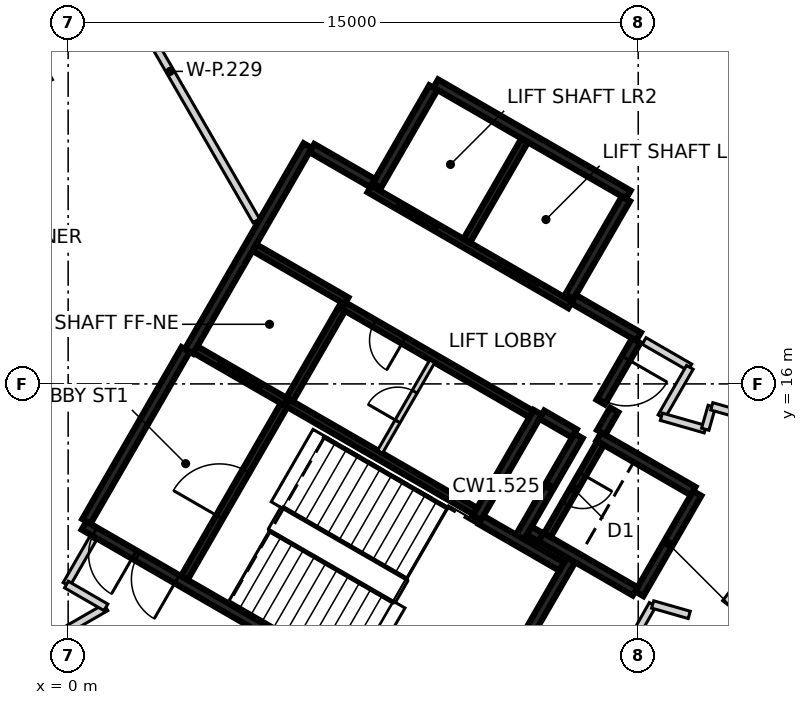
"""IFC4 building model, lengths in metres.
Left out: names, types, materials, properties, quantities, classifications, styles, units other than length and angle.
Written with IfcOpenShell. Run it as: python <this file> out.ifc"""

import sys

from ifc_helpers import new_model, si_unit, direction, frame, frame_2d, origin, place, context, subcontext, project, spatial, rectangle, extrude, element, fill, save


model = new_model("IFC4")
c1 = context("Model", 3, precision=1e-05, world=origin(), true_north=direction((0.0, 1.0)))
c2 = subcontext(c1, "Body", "Model", "MODEL_VIEW")
j1 = project(units=[si_unit("LENGTHUNIT", "METRE"), si_unit("PLANEANGLEUNIT", "RADIAN")], contexts=[c1])
p1 = place(None, origin())
s1 = spatial("IfcSite", under=j1, at=p1, CompositionType="ELEMENT")
p2 = place(p1, origin())
s2 = spatial("IfcBuilding", under=s1, at=p2, CompositionType="ELEMENT")
p3 = place(p2, frame((0.0, 0.0, 56.6)))
s3 = spatial("IfcBuildingStorey", under=s2, at=p3, CompositionType="ELEMENT", Elevation=56.6)
p4 = place(p3, frame((10.42, 6.498, 0.0), z_axis=(0.0, 0.0, 1.0), x_axis=(-0.866021906294, 0.500006057782, 0.0)))
e1 = element("IfcWall", 1, at=p4, inside=s3, PredefinedType="SHEAR", context=c2, shape_type="SweptSolid", body=[
    extrude(rectangle(XDim=11.55, YDim=0.25, at=frame_2d((5.775, 0.0))), origin(), (0.0, 0.0, 1.0), 3.125),
])
p5 = place(p4, frame((10.025, 0.0, 0.0)))
e2 = element("IfcOpeningElement", 2, at=p5, cuts=e1, PredefinedType="OPENING", context=c2, shape_type="SweptSolid", body=[
    extrude(rectangle(XDim=1.2, YDim=2.1, at=frame_2d((0.6, 1.05))), frame((0.0, 0.135, 0.0), z_axis=(0.0, -1.0, 0.0), x_axis=(1.0, 0.0, 0.0)), (0.0, 0.0, 1.0), 0.27),
])
p6 = place(p4, frame((8.725, 0.0, 0.0)))
e3 = element("IfcOpeningElement", 3, at=p6, cuts=e1, PredefinedType="OPENING", context=c2, shape_type="SweptSolid", body=[
    extrude(rectangle(XDim=1.2, YDim=2.1, at=frame_2d((0.6, 1.05))), frame((0.0, 0.135, 0.0), z_axis=(0.0, -1.0, 0.0), x_axis=(1.0, 0.0, 0.0)), (0.0, 0.0, 1.0), 0.27),
])
p7 = place(p3, frame((3.179, 16.856, 0.0), z_axis=(0.0, 0.0, 1.0), x_axis=(0.500004234368, 0.866022959057, 0.0)))
e4 = element("IfcWall", 4, at=p7, inside=s3, PredefinedType="SHEAR", context=c2, shape_type="SweptSolid", body=[
    extrude(rectangle(XDim=6.25, YDim=0.25, at=frame_2d((3.125, 0.0))), origin(), (0.0, 0.0, 1.0), 3.125),
])
p8 = place(p3, frame((9.673, 23.903, 0.0), z_axis=(0.0, 0.0, 1.0), x_axis=(0.86603616409, -0.499981362141, 0.0)))
e5 = element("IfcWall", 5, at=p8, inside=s3, PredefinedType="SHEAR", context=c2, shape_type="SweptSolid", body=[
    extrude(rectangle(XDim=5.85, YDim=0.25, at=frame_2d((2.925, 0.0))), origin(), (0.0, 0.0, 1.0), 3.125),
])
p9 = place(p3, frame((0.48, 12.381, 0.0), z_axis=(0.0, 0.0, 1.0), x_axis=(0.49999885962, 0.866026062182, 0.0)))
e6 = element("IfcWall", 6, at=p9, inside=s3, PredefinedType="SHEAR", context=c2, shape_type="SweptSolid", body=[
    extrude(rectangle(XDim=5.225, YDim=0.25, at=frame_2d((2.612, 0.0))), origin(), (0.0, 0.0, 1.0), 3.125),
])
p10 = place(p3, frame((13.238, 11.378, 0.0), z_axis=(0.0, 0.0, 1.0), x_axis=(-0.500008851346, -0.866020293397, 0.0)))
e7 = element("IfcWall", 7, at=p10, inside=s3, PredefinedType="SHEAR", context=c2, shape_type="SweptSolid", body=[
    extrude(rectangle(XDim=5.51, YDim=0.25, at=frame_2d((2.755, 0.0))), origin(), (0.0, 0.0, 1.0), 3.125),
])
p11 = place(p3, frame((12.357, 15.252, 0.0), z_axis=(0.0, 0.0, 1.0), x_axis=(-0.500028443584, -0.866008981251, 0.0)))
e8 = element("IfcWall", 8, at=p11, inside=s3, PredefinedType="SHEAR", context=c2, shape_type="SweptSolid", body=[
    extrude(rectangle(XDim=3.2, YDim=0.25, at=frame_2d((1.6, 0.0))), origin(), (0.0, 0.0, 1.0), 3.125),
])
for number, where, z_axis, x_axis in (
    (9, (8.123, 21.219, 0.0), (0.0, 0.0, 1.0), (0.5, 0.866, 0.0)),
    (10, (14.676, 20.87, 0.0), (0.0, 0.0, 1.0), (-0.5, -0.866, 0.0)),
):
    element("IfcWall", number, at=place(p3, frame(where, z_axis=z_axis, x_axis=x_axis)), inside=s3, PredefinedType="SHEAR", context=c2, shape_type="SweptSolid", body=[
        extrude(rectangle(XDim=2.975, YDim=0.25, at=frame_2d((1.487, 0.0))), origin(), (0.0, 0.0, 1.0), 3.125),
    ])
p12 = place(p3, frame((16.552, 13.119, 0.0), z_axis=(0.0, 0.0, 1.0), x_axis=(-0.499978833458, -0.866037623948, 0.0)))
e11 = element("IfcWall", 11, at=p12, inside=s3, PredefinedType="SHEAR", context=c2, shape_type="SweptSolid", body=[
    extrude(rectangle(XDim=3.05, YDim=0.25, at=frame_2d((1.525, 0.0))), origin(), (0.0, 0.0, 1.0), 3.125),
])
p13 = place(p3, frame((14.918, 10.54, 0.0), z_axis=(0.0, 0.0, 1.0), x_axis=(-0.866063538972, 0.499933942099, 0.0)))
e12 = element("IfcWall", 12, at=p13, inside=s3, PredefinedType="SHEAR", context=c2, shape_type="SweptSolid", body=[
    extrude(rectangle(XDim=2.865, YDim=0.25, at=frame_2d((1.432, 0.0))), origin(), (0.0, 0.0, 1.0), 3.125),
])
p14 = place(p3, frame((13.963, 14.614, 0.0), z_axis=(0.0, 0.0, 1.0), x_axis=(0.866042235819, -0.499970844928, 0.0)))
e13 = element("IfcWall", 13, at=p14, inside=s3, PredefinedType="SHEAR", context=c2, shape_type="SweptSolid", body=[
    extrude(rectangle(XDim=2.865, YDim=0.25, at=frame_2d((1.432, 0.0))), origin(), (0.0, 0.0, 1.0), 3.125),
])
p15 = place(p3, frame((11.888, 11.961, 0.0), z_axis=(0.0, 0.0, 1.0), x_axis=(0.500003324108, 0.866023484601, 0.0)))
e14 = element("IfcWall", 14, at=p15, inside=s3, PredefinedType="SHEAR", context=c2, shape_type="SweptSolid", body=[
    extrude(rectangle(XDim=3.085, YDim=0.25, at=frame_2d((1.542, 0.0))), origin(), (0.0, 0.0, 1.0), 3.125),
])
p16 = place(p3, frame((10.865, 12.418, 0.0), z_axis=(0.0, 0.0, 1.0), x_axis=(0.866026229868, -0.499998569178, 0.0)))
e15 = element("IfcWall", 15, at=p16, inside=s3, PredefinedType="SHEAR", context=c2, shape_type="SweptSolid", body=[
    extrude(rectangle(XDim=2.449, YDim=0.25, at=frame_2d((1.225, 0.0))), origin(), (0.0, 0.0, 1.0), 3.125),
])
p17 = place(p3, frame((13.297, 18.231, 0.0), z_axis=(0.0, 0.0, 1.0), x_axis=(0.866043531843, -0.499968599967, 0.0)))
e16 = element("IfcWall", 16, at=p17, inside=s3, PredefinedType="SHEAR", context=c2, shape_type="SweptSolid", body=[
    extrude(rectangle(XDim=1.975, YDim=0.25, at=frame_2d((0.987, 0.0))), origin(), (0.0, 0.0, 1.0), 3.125),
])
p18 = place(p3, frame((6.413, 22.206, 0.0), z_axis=(0.0, 0.0, 1.0), x_axis=(0.866016279763, -0.500015802937, 0.0)))
e17 = element("IfcWall", 17, at=p18, inside=s3, PredefinedType="SHEAR", context=c2, shape_type="SweptSolid", body=[
    extrude(rectangle(XDim=1.849, YDim=0.25, at=frame_2d((0.925, 0.0))), origin(), (0.0, 0.0, 1.0), 3.125),
])
p19 = place(p3, frame((14.945, 17.135, 0.0), z_axis=(0.0, 0.0, 1.0), x_axis=(-0.499983108224, -0.866035156036, 0.0)))
e18 = element("IfcWall", 18, at=p19, inside=s3, PredefinedType="SHEAR", context=c2, shape_type="SweptSolid", body=[
    extrude(rectangle(XDim=1.865, YDim=0.25, at=frame_2d((0.932, 0.0))), origin(), (0.0, 0.0, 1.0), 3.125),
])
p20 = place(p19, frame((0.535, 0.0, 0.0)))
e19 = element("IfcOpeningElement", 19, at=p20, cuts=e18, PredefinedType="OPENING", context=c2, shape_type="SweptSolid", body=[
    extrude(rectangle(XDim=1.25, YDim=2.1, at=frame_2d((0.625, 1.05))), frame((0.0, 0.135, 0.0), z_axis=(0.0, -1.0, 0.0), x_axis=(1.0, 0.0, 0.0)), (0.0, 0.0, 1.0), 0.27),
])
p21 = place(p3, frame((13.322, 14.695, 0.0), z_axis=(0.0, 0.0, 1.0), x_axis=(-0.866017078145, 0.500014420154, 0.0)))
e20 = element("IfcWall", 20, at=p21, inside=s3, PredefinedType="SHEAR", context=c2, shape_type="SweptSolid", body=[
    extrude(rectangle(XDim=0.989, YDim=0.25, at=frame_2d((0.495, 0.0))), origin(), (0.0, 0.0, 1.0), 3.125),
])
p22 = place(p3, frame((14.368, 15.315, 0.0), z_axis=(0.0, 0.0, 1.0), x_axis=(-0.499897359611, -0.866084655132, 0.0)))
e21 = element("IfcWall", 21, at=p22, inside=s3, PredefinedType="SHEAR", context=c2, shape_type="SweptSolid", body=[
    extrude(rectangle(XDim=0.685, YDim=0.25, at=frame_2d((0.342, 0.0))), origin(), (0.0, 0.0, 1.0), 3.125),
])
p23 = place(p3, frame((12.433, 11.964, 0.0), z_axis=(0.0, 0.0, 1.0), x_axis=(-0.866055875208, 0.499947218231, 0.0)))
e22 = element("IfcWall", 22, at=p23, inside=s3, PredefinedType="SHEAR", context=c2, shape_type="SweptSolid", body=[
    extrude(rectangle(XDim=0.345, YDim=0.25, at=frame_2d((0.172, 0.0))), origin(), (0.0, 0.0, 1.0), 3.125),
])
p24 = place(p3, frame((13.21, 18.08, 0.0), z_axis=(0.0, 0.0, 1.0), x_axis=(-0.866030299012, 0.499991521122, 0.0)))
e23 = element("IfcWall", 23, at=p24, inside=s3, PredefinedType="SHEAR", context=c2, shape_type="SweptSolid", body=[
    extrude(rectangle(XDim=6.1, YDim=0.2, at=frame_2d((3.05, 0.0))), origin(), (0.0, 0.0, 1.0), 3.125),
])
p25 = place(p24, frame((1.0, 0.0, 0.0)))
e24 = element("IfcOpeningElement", 24, at=p25, cuts=e23, PredefinedType="OPENING", context=c2, shape_type="SweptSolid", body=[
    extrude(rectangle(XDim=1.2, YDim=2.1, at=frame_2d((0.6, 1.05))), frame((0.0, 0.11, 0.0), z_axis=(0.0, -1.0, 0.0), x_axis=(1.0, 0.0, 0.0)), (0.0, 0.0, 1.0), 0.22),
])
p26 = place(p24, frame((4.05, 0.0, 0.0)))
e25 = element("IfcOpeningElement", 25, at=p26, cuts=e23, PredefinedType="OPENING", context=c2, shape_type="SweptSolid", body=[
    extrude(rectangle(XDim=1.2, YDim=2.1, at=frame_2d((0.6, 1.05))), frame((0.0, 0.11, 0.0), z_axis=(0.0, -1.0, 0.0), x_axis=(1.0, 0.0, 0.0)), (0.0, 0.0, 1.0), 0.22),
])
p27 = place(p3, frame((5.775, 15.502, 0.0), z_axis=(0.0, 0.0, 1.0), x_axis=(0.866020080793, -0.500009219579, 0.0)))
e26 = element("IfcWall", 26, at=p27, inside=s3, PredefinedType="SHEAR", context=c2, shape_type="SweptSolid", body=[
    extrude(rectangle(XDim=5.699, YDim=0.2, at=frame_2d((2.85, 0.0))), origin(), (0.0, 0.0, 1.0), 3.125),
])
p28 = place(p3, frame((12.185, 15.207, 0.0), z_axis=(0.0, 0.0, 1.0), x_axis=(-0.866020080793, 0.500009219579, 0.0)))
e27 = element("IfcWall", 27, at=p28, inside=s3, PredefinedType="SHEAR", context=c2, shape_type="SweptSolid", body=[
    extrude(rectangle(XDim=5.699, YDim=0.2, at=frame_2d((2.85, 0.0))), origin(), (0.0, 0.0, 1.0), 3.125),
])
p29 = place(p28, frame((3.874, 0.0, 0.0)))
e28 = element("IfcOpeningElement", 28, at=p29, cuts=e27, PredefinedType="OPENING", context=c2, shape_type="SweptSolid", body=[
    extrude(rectangle(XDim=0.9, YDim=2.1, at=frame_2d((0.45, 1.05))), frame((0.0, 0.11, 0.0), z_axis=(0.0, -1.0, 0.0), x_axis=(1.0, 0.0, 0.0)), (0.0, 0.0, 1.0), 0.22),
])
p30 = place(p3, frame((3.057, 10.895, 0.0), z_axis=(0.0, 0.0, 1.0), x_axis=(0.499989418164, 0.866031513124, 0.0)))
e29 = element("IfcWall", 29, at=p30, inside=s3, PredefinedType="SHEAR", context=c2, shape_type="SweptSolid", body=[
    extrude(rectangle(XDim=5.251, YDim=0.2, at=frame_2d((2.625, 0.0))), origin(), (0.0, 0.0, 1.0), 3.125),
])
p31 = place(p30, frame((1.849, 0.0, 0.0)))
e30 = element("IfcOpeningElement", 30, at=p31, cuts=e29, PredefinedType="OPENING", context=c2, shape_type="SweptSolid", body=[
    extrude(rectangle(XDim=1.4, YDim=2.1, at=frame_2d((0.7, 1.05))), frame((0.0, 0.11, 0.0), z_axis=(0.0, -1.0, 0.0), x_axis=(1.0, 0.0, 0.0)), (0.0, 0.0, 1.0), 0.22),
])
p32 = place(p3, frame((10.489, 19.767, 0.0), z_axis=(0.0, 0.0, 1.0), x_axis=(0.499946628782, 0.866056215479, 0.0)))
e31 = element("IfcWall", 31, at=p32, inside=s3, PredefinedType="SHEAR", context=c2, shape_type="SweptSolid", body=[
    extrude(rectangle(XDim=3.048, YDim=0.2, at=frame_2d((1.524, 0.0))), origin(), (0.0, 0.0, 1.0), 3.125),
])
p33 = place(p3, frame((14.008, 14.442, 0.0), z_axis=(0.0, 0.0, 1.0), x_axis=(-0.499986818241, -0.866033014143, 0.0)))
e32 = element("IfcWall", 32, at=p33, inside=s3, PredefinedType="SHEAR", context=c2, shape_type="SweptSolid", body=[
    extrude(rectangle(XDim=2.798, YDim=0.2, at=frame_2d((1.399, 0.0))), origin(), (0.0, 0.0, 1.0), 3.125),
])
p34 = place(p33, frame((0.949, 0.0, 0.0)))
e33 = element("IfcOpeningElement", 33, at=p34, cuts=e32, PredefinedType="OPENING", context=c2, shape_type="SweptSolid", body=[
    extrude(rectangle(XDim=0.9, YDim=2.1, at=frame_2d((0.45, 1.05))), frame((0.0, 0.11, 0.0), z_axis=(0.0, -1.0, 0.0), x_axis=(1.0, 0.0, 0.0)), (0.0, 0.0, 1.0), 0.22),
])
p35 = place(p3, frame((7.199, 17.97, 0.0), z_axis=(0.0, 0.0, 1.0), x_axis=(-0.499968400327, -0.866043647095, 0.0)))
e34 = element("IfcWall", 34, at=p35, inside=s3, PredefinedType="SHEAR", context=c2, shape_type="SweptSolid", body=[
    extrude(rectangle(XDim=2.75, YDim=0.2, at=frame_2d((1.375, 0.0))), origin(), (0.0, 0.0, 1.0), 3.125),
])
p36 = place(p3, frame((5.725, 15.531, 0.0), z_axis=(0.0, 0.0, 1.0), x_axis=(-0.866037306777, 0.499979382845, 0.0)))
e35 = element("IfcWall", 35, at=p36, inside=s3, PredefinedType="SHEAR", context=c2, shape_type="SweptSolid", body=[
    extrude(rectangle(XDim=2.742, YDim=0.2, at=frame_2d((1.371, 0.0))), origin(), (0.0, 0.0, 1.0), 3.125),
])
p37 = place(p36, frame((0.743, 0.0, 0.0)))
e36 = element("IfcOpeningElement", 36, at=p37, cuts=e35, PredefinedType="OPENING", context=c2, shape_type="SweptSolid", body=[
    extrude(rectangle(XDim=1.3, YDim=2.1, at=frame_2d((0.65, 1.05))), frame((0.0, 0.11, 0.0), z_axis=(0.0, -1.0, 0.0), x_axis=(1.0, 0.0, 0.0)), (0.0, 0.0, 1.0), 0.22),
])
p38 = place(p3, frame((4.901, 19.586, 0.0), z_axis=(0.0, 0.0, 1.0), x_axis=(0.866022890907, -0.500004352405, 0.0)))
e37 = element("IfcWall", 37, at=p38, inside=s3, PredefinedType="SHEAR", context=c2, shape_type="SweptSolid", body=[
    extrude(rectangle(XDim=2.799, YDim=0.2, at=frame_2d((1.399, 0.0))), origin(), (0.0, 0.0, 1.0), 3.125),
])
p39 = place(p3, frame((8.207, 14.214, 0.0), z_axis=(0.0, 0.0, 1.0), x_axis=(0.499922376475, 0.866070215109, 0.0)))
e38 = element("IfcWall", 38, at=p39, inside=s3, PredefinedType="PARTITIONING", context=c2, shape_type="SweptSolid", body=[
    extrude(rectangle(XDim=2.749, YDim=0.15, at=frame_2d((1.374, 0.0))), origin(), (0.0, 0.0, 1.0), 3.125),
])
p40 = place(p39, frame((0.924, 0.0, 0.0)))
e39 = element("IfcOpeningElement", 39, at=p40, cuts=e38, PredefinedType="OPENING", context=c2, shape_type="SweptSolid", body=[
    extrude(rectangle(XDim=0.9, YDim=2.1, at=frame_2d((0.45, 1.05))), frame((0.0, 0.085, 0.0), z_axis=(0.0, -1.0, 0.0), x_axis=(1.0, 0.0, 0.0)), (0.0, 0.0, 1.0), 0.17),
])
p41 = place(p3, frame((-0.045, 9.522, 0.0), z_axis=(0.0, 0.0, 1.0), x_axis=(0.86625675314, 0.499599076899, 0.0)))
e40 = element("IfcWall", 40, at=p41, inside=s3, PredefinedType="PARTITIONING", context=c2, shape_type="SweptSolid", body=[
    extrude(rectangle(XDim=1.199, YDim=0.2, at=frame_2d((0.6, 0.0))), origin(), (0.0, 0.0, 1.0), 3.125),
])
p42 = place(p3, frame((-0.045, 10.722, 0.0), z_axis=(0.0, 0.0, 1.0), x_axis=(0.500107785535, 0.865963164833, 0.0)))
e41 = element("IfcWall", 41, at=p42, inside=s3, PredefinedType="PARTITIONING", context=c2, shape_type="SweptSolid", body=[
    extrude(rectangle(XDim=1.389, YDim=0.2, at=frame_2d((0.695, 0.0))), origin(), (0.0, 0.0, 1.0), 3.125),
])
p43 = place(p3, frame((-0.045, 10.721, 0.0), z_axis=(0.0, 0.0, 1.0), x_axis=(0.865992388649, -0.500057179532, 0.0)))
e42 = element("IfcWall", 42, at=p43, inside=s3, PredefinedType="PARTITIONING", context=c2, shape_type="SweptSolid", body=[
    extrude(rectangle(XDim=1.199, YDim=0.2, at=frame_2d((0.6, 0.0))), origin(), (0.0, 0.0, 1.0), 3.125),
])
p44 = place(p3, frame((12.433, 4.992, 0.0), z_axis=(0.0, 0.0, 1.0), x_axis=(0.492583054982, 0.870265438786, 0.0)))
e43 = element("IfcWall", 43, at=p44, inside=s3, PredefinedType="PARTITIONING", context=c2, shape_type="SweptSolid", body=[
    extrude(rectangle(XDim=5.981, YDim=0.2, at=frame_2d((2.991, 0.0))), origin(), (0.0, 0.0, 1.0), 3.125),
])
p45 = place(p44, frame((3.469, 0.0, 0.0)))
e44 = element("IfcOpeningElement", 44, at=p45, cuts=e43, PredefinedType="OPENING", context=c2, shape_type="SweptSolid", body=[
    extrude(rectangle(XDim=1.0, YDim=2.1, at=frame_2d((0.5, 1.05))), frame((0.0, 0.11, 0.0), z_axis=(0.0, -1.0, 0.0), x_axis=(1.0, 0.0, 0.0)), (0.0, 0.0, 1.0), 0.22),
])
p46 = place(p3, frame((15.156, 17.13, 0.0), z_axis=(0.0, 0.0, 1.0), x_axis=(0.865755062894, -0.500467952093, 0.0)))
e45 = element("IfcWall", 45, at=p46, inside=s3, PredefinedType="PARTITIONING", context=c2, shape_type="SweptSolid", body=[
    extrude(rectangle(XDim=1.389, YDim=0.2, at=frame_2d((0.694, 0.0))), origin(), (0.0, 0.0, 1.0), 3.125),
])
p47 = place(p3, frame((15.38, 10.197, 0.0), z_axis=(0.0, 0.0, 1.0), x_axis=(0.961523947641, -0.274721127897, 0.0)))
e46 = element("IfcWall", 46, at=p47, inside=s3, PredefinedType="PARTITIONING", context=c2, shape_type="SweptSolid", body=[
    extrude(rectangle(XDim=1.001, YDim=0.2, at=frame_2d((0.5, 0.0))), origin(), (0.0, 0.0, 1.0), 3.125),
])
p48 = place(p3, frame((15.609, 15.136, 0.0), z_axis=(0.0, 0.0, 1.0), x_axis=(0.499501622561, 0.866312950993, 0.0)))
e47 = element("IfcWall", 47, at=p48, inside=s3, PredefinedType="PARTITIONING", context=c2, shape_type="SweptSolid", body=[
    extrude(rectangle(XDim=1.5, YDim=0.2, at=frame_2d((0.75, 0.0))), origin(), (0.0, 0.0, 1.0), 3.125),
])
p49 = place(p3, frame((15.609, 15.136, 0.0), z_axis=(0.0, 0.0, 1.0), x_axis=(0.961662011825, -0.274237442763, 0.0)))
e48 = element("IfcWall", 48, at=p49, inside=s3, PredefinedType="PARTITIONING", context=c2, shape_type="SweptSolid", body=[
    extrude(rectangle(XDim=1.2, YDim=0.2, at=frame_2d((0.6, 0.0))), origin(), (0.0, 0.0, 1.0), 3.125),
])
p50 = place(p3, frame((16.763, 14.807, 0.0), z_axis=(0.0, 0.0, 1.0), x_axis=(0.274464026122, 0.961597368115, 0.0)))
e49 = element("IfcWall", 49, at=p50, inside=s3, PredefinedType="PARTITIONING", context=c2, shape_type="SweptSolid", body=[
    extrude(rectangle(XDim=0.627, YDim=0.2, at=frame_2d((0.313, 0.0))), origin(), (0.0, 0.0, 1.0), 3.125),
])
p51 = place(p3, frame((16.935, 15.41, 0.0), z_axis=(0.0, 0.0, 1.0), x_axis=(0.961602664273, -0.274445470107, 0.0)))
e50 = element("IfcWall", 50, at=p51, inside=s3, PredefinedType="PARTITIONING", context=c2, shape_type="SweptSolid", body=[
    extrude(rectangle(XDim=0.936, YDim=0.2, at=frame_2d((0.468, 0.0))), origin(), (0.0, 0.0, 1.0), 3.125),
])
p52 = place(p3, frame((17.299, 10.235, 0.0), z_axis=(0.0, 0.0, 1.0), x_axis=(0.61377461522, 0.789481299153, 0.0)))
e51 = element("IfcWall", 51, at=p52, inside=s3, PredefinedType="PARTITIONING", context=c2, shape_type="SweptSolid", body=[
    extrude(rectangle(XDim=2.851, YDim=0.2, at=frame_2d((1.426, 0.0))), origin(), (0.0, 0.0, 1.0), 3.125),
])
p53 = place(p3, frame((0.412, 28.153, 0.0), z_axis=(0.0, 0.0, 1.0), x_axis=(0.500039143415, -0.866002803143, 0.0)))
e52 = element("IfcWall", 52, at=p53, inside=s3, PredefinedType="PARTITIONING", context=c2, shape_type="SweptSolid", body=[
    extrude(rectangle(XDim=9.075, YDim=0.2, at=frame_2d((4.538, 0.0))), origin(), (0.0, 0.0, 1.0), 2.225),
])
p54 = place(p37, origin())
e53 = element("IfcDoor", 53, at=p54, inside=s3, OperationType="SLIDING_TO_RIGHT", PredefinedType="DOOR", context=c2, shape_type="SweptSolid", body=[
    extrude(rectangle(XDim=1.3, YDim=2.1, at=frame_2d((0.65, 1.05))), frame((0.0, 0.025, 0.0), z_axis=(0.0, -1.0, 0.0), x_axis=(1.0, 0.0, 0.0)), (0.0, 0.0, 1.0), 0.05),
])
fill(e36, e53)
p55 = place(p25, origin())
e54 = element("IfcDoor", 54, at=p55, inside=s3, OperationType="DOUBLE_DOOR_SLIDING", PredefinedType="DOOR", context=c2, shape_type="SweptSolid", body=[
    extrude(rectangle(XDim=1.2, YDim=2.1, at=frame_2d((0.6, 1.05))), frame((0.0, 0.025, 0.0), z_axis=(0.0, -1.0, 0.0), x_axis=(1.0, 0.0, 0.0)), (0.0, 0.0, 1.0), 0.05),
])
fill(e24, e54)
p56 = place(p26, origin())
e55 = element("IfcDoor", 55, at=p56, inside=s3, OperationType="DOUBLE_DOOR_SLIDING", PredefinedType="DOOR", context=c2, shape_type="SweptSolid", body=[
    extrude(rectangle(XDim=1.2, YDim=2.1, at=frame_2d((0.6, 1.05))), frame((0.0, 0.025, 0.0), z_axis=(0.0, -1.0, 0.0), x_axis=(1.0, 0.0, 0.0)), (0.0, 0.0, 1.0), 0.05),
])
fill(e25, e55)
p57 = place(p20, origin())
e56 = element("IfcDoor", 56, at=p57, inside=s3, OperationType="SINGLE_SWING_LEFT", PredefinedType="DOOR", context=c2, shape_type="SweptSolid", body=[
    extrude(rectangle(XDim=1.25, YDim=2.1, at=frame_2d((0.625, 1.05))), frame((0.0, 0.025, 0.0), z_axis=(0.0, -1.0, 0.0), x_axis=(1.0, 0.0, 0.0)), (0.0, 0.0, 1.0), 0.05),
])
fill(e19, e56)
p58 = place(p5, origin())
e57 = element("IfcDoor", 57, at=p58, inside=s3, OperationType="SINGLE_SWING_LEFT", PredefinedType="DOOR", context=c2, shape_type="SweptSolid", body=[
    extrude(rectangle(XDim=1.2, YDim=2.1, at=frame_2d((0.6, 1.05))), frame((0.0, 0.025, 0.0), z_axis=(0.0, -1.0, 0.0), x_axis=(1.0, 0.0, 0.0)), (0.0, 0.0, 1.0), 0.05),
])
fill(e2, e57)
p59 = place(p6, origin())
e58 = element("IfcDoor", 58, at=p59, inside=s3, OperationType="SINGLE_SWING_RIGHT", PredefinedType="DOOR", context=c2, shape_type="SweptSolid", body=[
    extrude(rectangle(XDim=1.2, YDim=2.1, at=frame_2d((0.6, 1.05))), frame((0.0, 0.025, 0.0), z_axis=(0.0, -1.0, 0.0), x_axis=(1.0, 0.0, 0.0)), (0.0, 0.0, 1.0), 0.05),
])
fill(e3, e58)
p60 = place(p31, origin())
e59 = element("IfcDoor", 59, at=p60, inside=s3, OperationType="SINGLE_SWING_RIGHT", PredefinedType="DOOR", context=c2, shape_type="SweptSolid", body=[
    extrude(rectangle(XDim=1.4, YDim=2.1, at=frame_2d((0.7, 1.05))), frame((0.0, 0.025, 0.0), z_axis=(0.0, -1.0, 0.0), x_axis=(1.0, 0.0, 0.0)), (0.0, 0.0, 1.0), 0.05),
])
fill(e30, e59)
p61 = place(p29, origin())
e60 = element("IfcDoor", 60, at=p61, inside=s3, OperationType="SINGLE_SWING_LEFT", PredefinedType="DOOR", context=c2, shape_type="SweptSolid", body=[
    extrude(rectangle(XDim=0.9, YDim=2.1, at=frame_2d((0.45, 1.05))), frame((0.0, 0.025, 0.0), z_axis=(0.0, -1.0, 0.0), x_axis=(1.0, 0.0, 0.0)), (0.0, 0.0, 1.0), 0.05),
])
fill(e28, e60)
p62 = place(p34, origin())
e61 = element("IfcDoor", 61, at=p62, inside=s3, OperationType="SINGLE_SWING_RIGHT", PredefinedType="DOOR", context=c2, shape_type="SweptSolid", body=[
    extrude(rectangle(XDim=0.9, YDim=2.1, at=frame_2d((0.45, 1.05))), frame((0.0, 0.025, 0.0), z_axis=(0.0, -1.0, 0.0), x_axis=(1.0, 0.0, 0.0)), (0.0, 0.0, 1.0), 0.05),
])
fill(e33, e61)
p63 = place(p40, origin())
e62 = element("IfcDoor", 62, at=p63, inside=s3, OperationType="SINGLE_SWING_LEFT", PredefinedType="DOOR", context=c2, shape_type="SweptSolid", body=[
    extrude(rectangle(XDim=0.9, YDim=2.1, at=frame_2d((0.45, 1.05))), frame((0.0, 0.025, 0.0), z_axis=(0.0, -1.0, 0.0), x_axis=(1.0, 0.0, 0.0)), (0.0, 0.0, 1.0), 0.05),
])
fill(e39, e62)
save(model, sys.argv[1])
